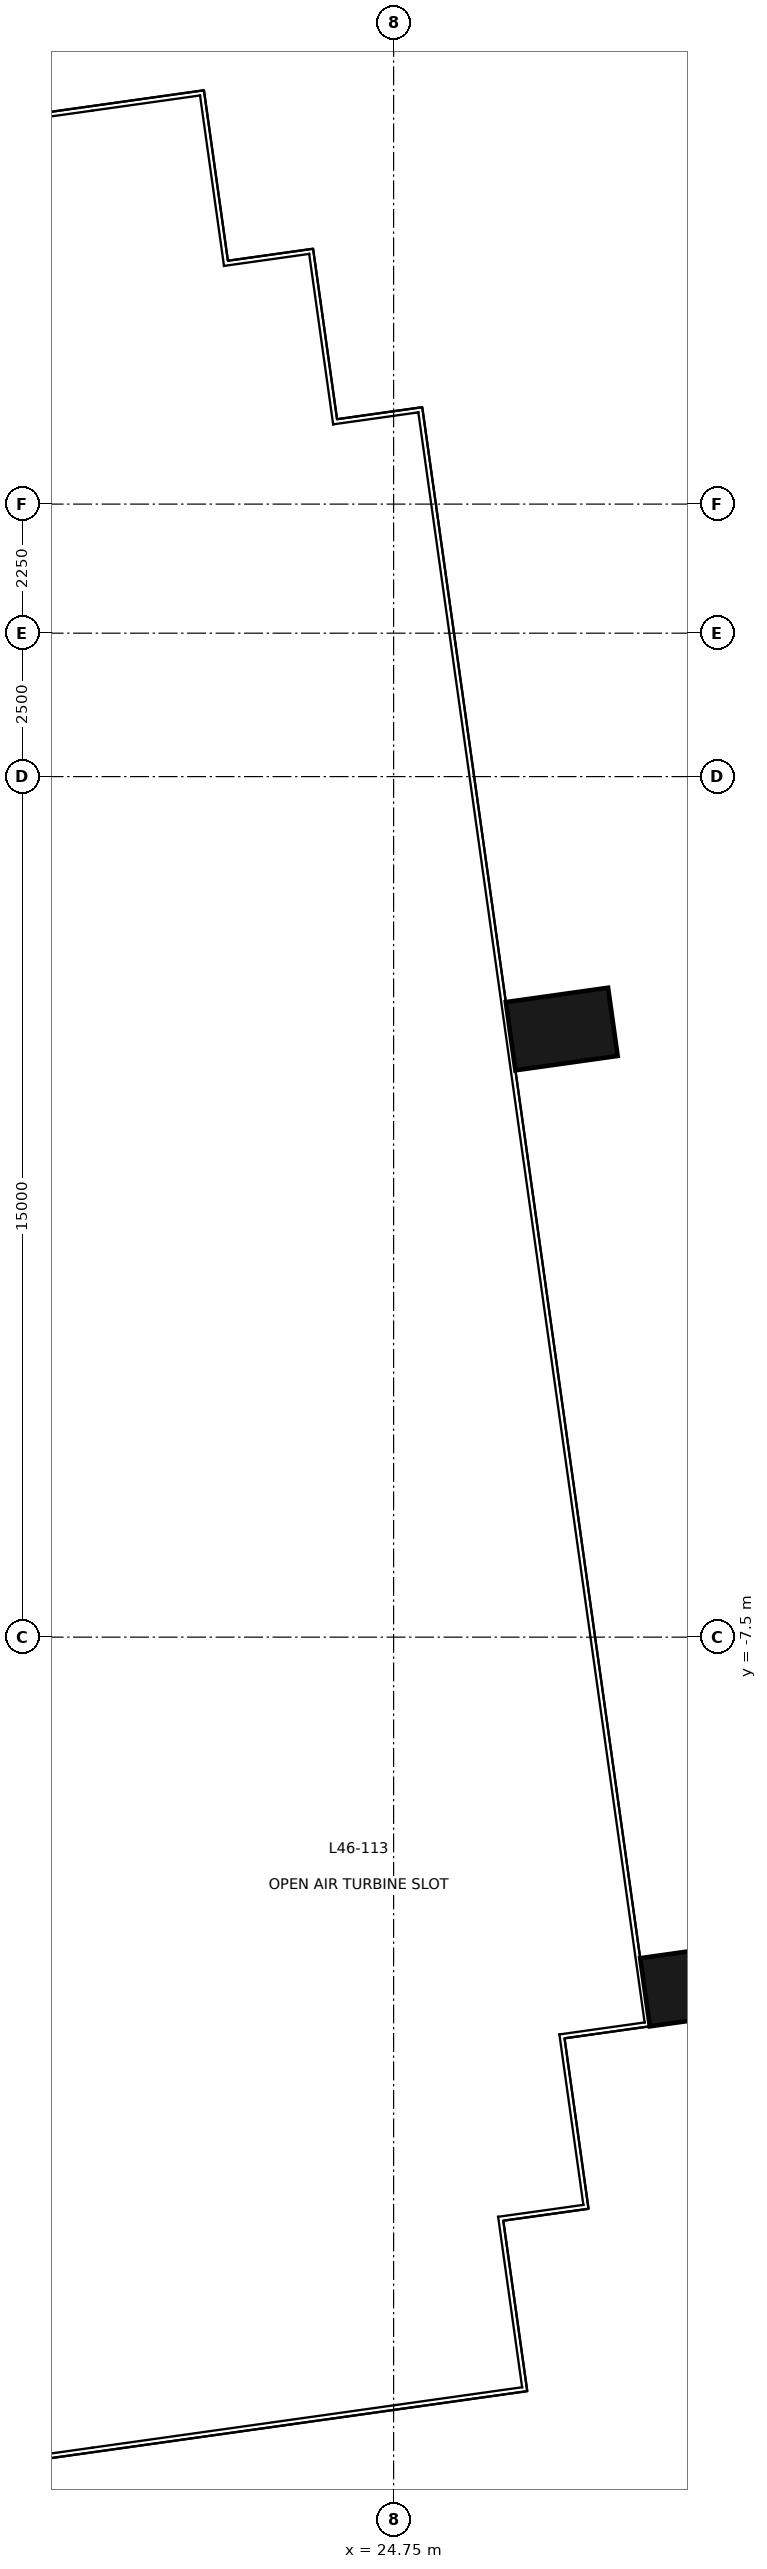
"""IFC4 building model, lengths in metres.
Left out: names, types, materials, properties, quantities, classifications, styles, units other than length and angle.
Written with IfcOpenShell. Run it as: python <this file> out.ifc"""

import sys

from ifc_helpers import new_model, si_unit, direction, frame, origin, origin_2d, place, context, subcontext, project, spatial, rectangle, extrude, element, save


model = new_model("IFC4")
c1 = context("Model", 3, precision=1e-05, world=origin(), true_north=direction((0.0, 1.0)))
c2 = subcontext(c1, "Body", "Model", "MODEL_VIEW")
j1 = project(units=[si_unit("LENGTHUNIT", "METRE"), si_unit("PLANEANGLEUNIT", "RADIAN")], contexts=[c1])
p1 = place(None, origin())
s1 = spatial("IfcSite", under=j1, at=p1, CompositionType="ELEMENT")
p2 = place(p1, origin())
s2 = spatial("IfcBuilding", under=s1, at=p2, CompositionType="ELEMENT")
p3 = place(p2, frame((0.0, 0.0, 199.7)))
s3 = spatial("IfcBuildingStorey", under=s2, at=p3, CompositionType="ELEMENT", Elevation=199.7)
for number, where, z_axis, x_axis in (
    (1, (30.024, -13.565, -0.2), (0.0, 0.0, 1.0), (-0.139, 0.99, 0.0)),
    (2, (27.681, 3.1, -0.2), (0.0, 0.0, 1.0), (-0.139, 0.99, 0.0)),
):
    element("IfcColumn", number, at=place(p3, frame(where, z_axis=z_axis, x_axis=x_axis)), inside=s3, PredefinedType="COLUMN", context=c2, shape_type="SweptSolid", body=[
        extrude(rectangle(XDim=1.2, YDim=1.8, at=origin_2d()), origin(), (0.0, 0.0, 1.0), 8.4),
    ])
save(model, sys.argv[1])
